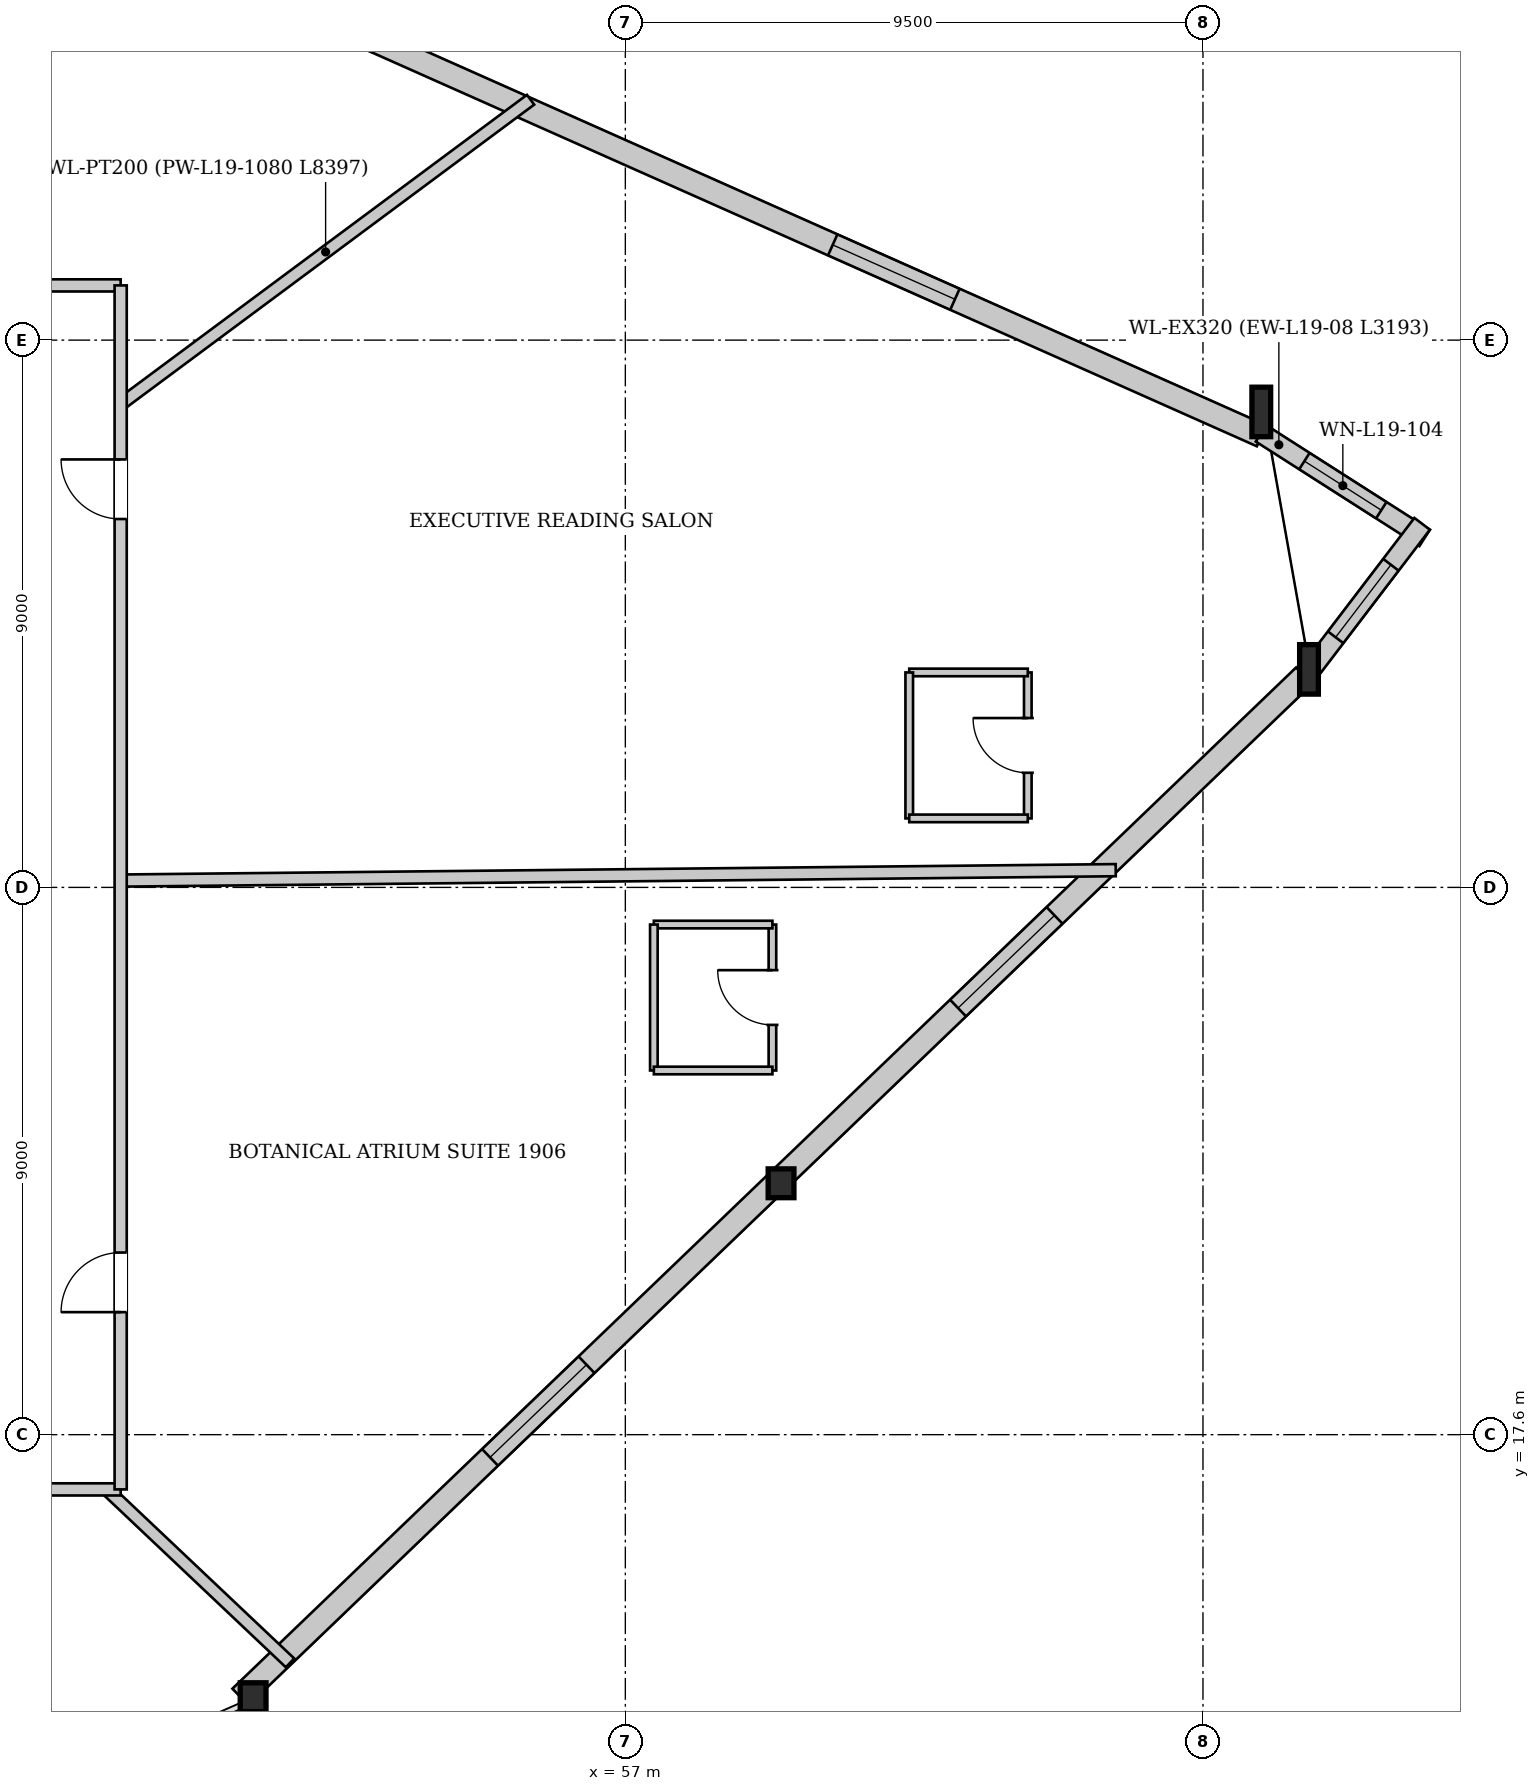
"""IFC4 building model, lengths in metres.
Left out: names, types, materials, properties, quantities, classifications, styles, units other than length and angle.
Written with IfcOpenShell. Run it as: python <this file> out.ifc"""

import sys

from ifc_helpers import new_model, si_unit, direction, frame, frame_2d, origin, origin_2d, place, context, subcontext, project, spatial, rectangle, i_section, extrude, source, transform, mapped, element, fill, save


model = new_model("IFC4")
c1 = context("Model", 3, precision=1e-05, world=origin(), true_north=direction((0.0, 1.0)))
c2 = subcontext(c1, "Body", "Model", "MODEL_VIEW")
j1 = project(units=[si_unit("LENGTHUNIT", "METRE"), si_unit("PLANEANGLEUNIT", "RADIAN")], contexts=[c1])
p1 = place(None, origin())
s1 = spatial("IfcSite", under=j1, at=p1, CompositionType="ELEMENT")
p2 = place(p1, origin())
s2 = spatial("IfcBuilding", under=s1, at=p2, CompositionType="ELEMENT")
p3 = place(p2, frame((0.0, 0.0, 75.9)))
s3 = spatial("IfcBuildingStorey", under=s2, at=p3, CompositionType="ELEMENT", Elevation=75.9)
m1 = source(origin(), c2, "Body", "SweptSolid", [
    extrude(i_section(OverallWidth=0.308, OverallDepth=0.814, WebThickness=0.021, FlangeThickness=0.04, at=origin_2d()), origin(), (0.0, 0.0, 1.0), 3.867),
])
p4 = place(p3, frame((68.295, 29.943, 0.0), z_axis=(-0.026704643692, 0.1255055122, 0.991733446251), x_axis=(-0.978103798124, -0.208117659259, 0.0)))
e1 = element("IfcColumn", 1, at=p4, inside=s3, PredefinedType="COLUMN", context=c2, shape_type="MappedRepresentation", body=[
    mapped(m1, transform((0.0, 0.0, 0.0), x_axis=(1.0, 0.0, 0.0), y_axis=(0.0, 1.0, 0.0), z_axis=(0.0, 0.0, 1.0), scale=1.0)),
])
m2 = source(origin(), c2, "Body", "SweptSolid", [
    extrude(i_section(OverallWidth=0.308, OverallDepth=0.814, WebThickness=0.021, FlangeThickness=0.04, at=origin_2d()), origin(), (0.0, 0.0, 1.0), 3.863),
])
p5 = place(p3, frame((67.541, 34.201, 0.0), z_axis=(-0.042151057581, 0.112739860157, 0.992730080272), x_axis=(-0.936673957719, -0.350202651233, 0.0)))
e2 = element("IfcColumn", 2, at=p5, inside=s3, PredefinedType="COLUMN", context=c2, shape_type="MappedRepresentation", body=[
    mapped(m2, transform((0.0, 0.0, 0.0), x_axis=(1.0, 0.0, 0.0), y_axis=(0.0, 1.0, 0.0), z_axis=(0.0, 0.0, 1.0), scale=1.0)),
])
m3 = source(origin(), c2, "Body", "SweptSolid", [
    extrude(i_section(OverallWidth=0.424, OverallDepth=0.474, WebThickness=0.043, FlangeThickness=0.068, at=origin_2d()), origin(), (0.0, 0.0, 1.0), 3.848),
])
p6 = place(p3, frame((50.801, 13.149, 0.0), z_axis=(0.040228034609, 0.069732823399, 0.996754251846), x_axis=(-0.866198707335, 0.499699709236, 0.0)))
e3 = element("IfcColumn", 3, at=p6, inside=s3, PredefinedType="COLUMN", context=c2, shape_type="MappedRepresentation", body=[
    mapped(m3, transform((0.0, 0.0, 0.0), x_axis=(1.0, 0.0, 0.0), y_axis=(0.0, 1.0, 0.0), z_axis=(0.0, 0.0, 1.0), scale=1.0)),
])
m4 = source(origin(), c2, "Body", "SweptSolid", [
    extrude(i_section(OverallWidth=0.424, OverallDepth=0.474, WebThickness=0.043, FlangeThickness=0.068, at=origin_2d()), origin(), (0.0, 0.0, 1.0), 3.854),
])
p7 = place(p3, frame((59.548, 21.546, 0.0), z_axis=(0.006715214046, 0.097814061193, 0.995182051352), x_axis=(-0.997651690921, 0.068491631631, 0.0)))
e4 = element("IfcColumn", 4, at=p7, inside=s3, PredefinedType="COLUMN", context=c2, shape_type="MappedRepresentation", body=[
    mapped(m4, transform((0.0, 0.0, 0.0), x_axis=(1.0, 0.0, 0.0), y_axis=(0.0, 1.0, 0.0), z_axis=(0.0, 0.0, 1.0), scale=1.0)),
])
p8 = place(p3, frame((45.866, 43.639, 0.0), z_axis=(0.0, 0.0, 1.0), x_axis=(0.91360999261, -0.406591664207, 0.0)))
e5 = element("IfcWall", 5, at=p8, inside=s3, PredefinedType="SOLIDWALL", context=c2, shape_type="SweptSolid", body=[
    extrude(rectangle(XDim=23.639, YDim=0.38, at=frame_2d((11.82, 0.0))), origin(), (0.0, 0.0, 1.0), 2.872),
])
p9 = place(p8, frame((5.519, 0.0, 0.502)))
e6 = element("IfcOpeningElement", 6, at=p9, cuts=e5, PredefinedType="OPENING", context=c2, shape_type="SweptSolid", body=[
    extrude(rectangle(XDim=2.2, YDim=2.25, at=frame_2d((1.1, 1.125))), frame((0.0, 0.2, 0.0), z_axis=(0.0, -1.0, 0.0), x_axis=(1.0, 0.0, 0.0)), (0.0, 0.0, 1.0), 0.4),
])
p10 = place(p8, frame((15.92, 0.0, 0.502)))
e7 = element("IfcOpeningElement", 7, at=p10, cuts=e5, PredefinedType="OPENING", context=c2, shape_type="SweptSolid", body=[
    extrude(rectangle(XDim=2.2, YDim=2.25, at=frame_2d((1.1, 1.125))), frame((0.0, 0.2, 0.0), z_axis=(0.0, -1.0, 0.0), x_axis=(1.0, 0.0, 0.0)), (0.0, 0.0, 1.0), 0.4),
])
p11 = place(p3, frame((67.454, 34.067, 0.0), z_axis=(0.0, 0.0, 1.0), x_axis=(0.842734794545, -0.53832895711, 0.0)))
e8 = element("IfcWall", 8, at=p11, inside=s3, PredefinedType="SOLIDWALL", context=c2, shape_type="SweptSolid", body=[
    extrude(rectangle(XDim=3.194, YDim=0.32, at=frame_2d((1.597, 0.0))), origin(), (0.0, 0.0, 1.0), 2.872),
])
p12 = place(p11, frame((0.847, 0.0, 0.452)))
e9 = element("IfcOpeningElement", 9, at=p12, cuts=e8, PredefinedType="OPENING", context=c2, shape_type="SweptSolid", body=[
    extrude(rectangle(XDim=1.5, YDim=2.3, at=frame_2d((0.75, 1.15))), frame((0.0, 0.17, 0.0), z_axis=(0.0, -1.0, 0.0), x_axis=(1.0, 0.0, 0.0)), (0.0, 0.0, 1.0), 0.34),
])
p13 = place(p3, frame((70.104, 32.579, 0.0), z_axis=(0.0, 0.0, 1.0), x_axis=(-0.606317277032, -0.795222836425, 0.0)))
e10 = element("IfcWall", 10, at=p13, inside=s3, PredefinedType="SOLIDWALL", context=c2, shape_type="SweptSolid", body=[
    extrude(rectangle(XDim=3.194, YDim=0.32, at=frame_2d((1.597, 0.0))), origin(), (0.0, 0.0, 1.0), 2.872),
])
p14 = place(p13, frame((0.847, 0.0, 0.452)))
e11 = element("IfcOpeningElement", 11, at=p14, cuts=e10, PredefinedType="OPENING", context=c2, shape_type="SweptSolid", body=[
    extrude(rectangle(XDim=1.5, YDim=2.3, at=frame_2d((0.75, 1.15))), frame((0.0, 0.17, 0.0), z_axis=(0.0, -1.0, 0.0), x_axis=(1.0, 0.0, 0.0)), (0.0, 0.0, 1.0), 0.34),
])
p15 = place(p3, frame((68.164, 30.08, 0.0), z_axis=(0.0, 0.0, 1.0), x_axis=(-0.721395971685, -0.692522816979, 0.0)))
e12 = element("IfcWall", 12, at=p15, inside=s3, PredefinedType="SOLIDWALL", context=c2, shape_type="SweptSolid", body=[
    extrude(rectangle(XDim=24.251, YDim=0.38, at=frame_2d((12.125, 0.0))), origin(), (0.0, 0.0, 1.0), 2.872),
])
p16 = place(p15, frame((5.69, 0.0, 0.502)))
e13 = element("IfcOpeningElement", 13, at=p16, cuts=e12, PredefinedType="OPENING", context=c2, shape_type="SweptSolid", body=[
    extrude(rectangle(XDim=2.2, YDim=2.25, at=frame_2d((1.1, 1.125))), frame((0.0, 0.2, 0.0), z_axis=(0.0, -1.0, 0.0), x_axis=(1.0, 0.0, 0.0)), (0.0, 0.0, 1.0), 0.4),
])
p17 = place(p15, frame((16.36, 0.0, 0.502)))
e14 = element("IfcOpeningElement", 14, at=p17, cuts=e12, PredefinedType="OPENING", context=c2, shape_type="SweptSolid", body=[
    extrude(rectangle(XDim=2.2, YDim=2.25, at=frame_2d((1.1, 1.125))), frame((0.0, 0.2, 0.0), z_axis=(0.0, -1.0, 0.0), x_axis=(1.0, 0.0, 0.0)), (0.0, 0.0, 1.0), 0.4),
])
p18 = place(p3, frame((48.7, 34.546, 0.0), z_axis=(0.0, 0.0, 1.0), x_axis=(0.8028205869, 0.596220685023, 0.0)))
e15 = element("IfcWall", 15, at=p18, inside=s3, PredefinedType="PARTITIONING", context=c2, shape_type="SweptSolid", body=[
    extrude(rectangle(XDim=8.397, YDim=0.2, at=frame_2d((4.199, 0.0))), origin(), (0.0, 0.0, 1.0), 3.58),
])
p19 = place(p3, frame((48.469, 16.7, 0.0), z_axis=(0.0, 0.0, 1.0), x_axis=(0.726589007233, -0.687072350316, 0.0)))
e16 = element("IfcWall", 16, at=p19, inside=s3, PredefinedType="PARTITIONING", context=c2, shape_type="SweptSolid", body=[
    extrude(rectangle(XDim=4.152, YDim=0.2, at=frame_2d((2.076, 0.0))), origin(), (0.0, 0.0, 1.0), 3.58),
])
p20 = place(p3, frame((48.7, 26.712, 0.0), z_axis=(0.0, 0.0, 1.0), x_axis=(0.999945322825, 0.010457120052, 0.0)))
e17 = element("IfcWall", 17, at=p20, inside=s3, PredefinedType="PARTITIONING", context=c2, shape_type="SweptSolid", body=[
    extrude(rectangle(XDim=16.366, YDim=0.2, at=frame_2d((8.183, 0.0))), origin(), (0.0, 0.0, 1.0), 3.58),
])
p21 = place(p3, frame((59.419, 23.589, 0.0), z_axis=(0.0, 0.0, 1.0), x_axis=(0.0, 1.0, 0.0)))
e18 = element("IfcWall", 18, at=p21, inside=s3, PredefinedType="PARTITIONING", context=c2, shape_type="SweptSolid", body=[
    extrude(rectangle(XDim=2.4, YDim=0.125, at=frame_2d((1.2, 0.0))), origin(), (0.0, 0.0, 1.0), 3.58),
])
p22 = place(p21, frame((0.75, 0.0, 0.0)))
e19 = element("IfcOpeningElement", 19, at=p22, cuts=e18, PredefinedType="OPENING", context=c2, shape_type="SweptSolid", body=[
    extrude(rectangle(XDim=0.9, YDim=2.1, at=frame_2d((0.45, 1.05))), frame((0.0, 0.073, 0.0), z_axis=(0.0, -1.0, 0.0), x_axis=(1.0, 0.0, 0.0)), (0.0, 0.0, 1.0), 0.145),
])
p23 = place(p3, frame((59.419, 25.989, 0.0), z_axis=(0.0, 0.0, 1.0), x_axis=(-1.0, 0.0, 0.0)))
e20 = element("IfcWall", 20, at=p23, inside=s3, PredefinedType="PARTITIONING", context=c2, shape_type="SweptSolid", body=[
    extrude(rectangle(XDim=1.95, YDim=0.125, at=frame_2d((0.975, 0.0))), origin(), (0.0, 0.0, 1.0), 3.58),
])
p24 = place(p3, frame((57.469, 25.989, 0.0), z_axis=(0.0, 0.0, 1.0), x_axis=(0.0, -1.0, 0.0)))
e21 = element("IfcWall", 21, at=p24, inside=s3, PredefinedType="PARTITIONING", context=c2, shape_type="SweptSolid", body=[
    extrude(rectangle(XDim=2.4, YDim=0.125, at=frame_2d((1.2, 0.0))), origin(), (0.0, 0.0, 1.0), 3.58),
])
p25 = place(p3, frame((57.469, 23.589, 0.0), z_axis=(0.0, 0.0, 1.0), x_axis=(1.0, 0.0, 0.0)))
e22 = element("IfcWall", 22, at=p25, inside=s3, PredefinedType="PARTITIONING", context=c2, shape_type="SweptSolid", body=[
    extrude(rectangle(XDim=1.95, YDim=0.125, at=frame_2d((0.975, 0.0))), origin(), (0.0, 0.0, 1.0), 3.58),
])
p26 = place(p3, frame((63.619, 27.735, 0.0), z_axis=(0.0, 0.0, 1.0), x_axis=(0.0, 1.0, 0.0)))
e23 = element("IfcWall", 23, at=p26, inside=s3, PredefinedType="PARTITIONING", context=c2, shape_type="SweptSolid", body=[
    extrude(rectangle(XDim=2.4, YDim=0.125, at=frame_2d((1.2, 0.0))), origin(), (0.0, 0.0, 1.0), 3.58),
])
p27 = place(p26, frame((0.75, 0.0, 0.0)))
e24 = element("IfcOpeningElement", 24, at=p27, cuts=e23, PredefinedType="OPENING", context=c2, shape_type="SweptSolid", body=[
    extrude(rectangle(XDim=0.9, YDim=2.1, at=frame_2d((0.45, 1.05))), frame((0.0, 0.073, 0.0), z_axis=(0.0, -1.0, 0.0), x_axis=(1.0, 0.0, 0.0)), (0.0, 0.0, 1.0), 0.145),
])
p28 = place(p3, frame((63.619, 30.135, 0.0), z_axis=(0.0, 0.0, 1.0), x_axis=(-1.0, 0.0, 0.0)))
e25 = element("IfcWall", 25, at=p28, inside=s3, PredefinedType="PARTITIONING", context=c2, shape_type="SweptSolid", body=[
    extrude(rectangle(XDim=1.95, YDim=0.125, at=frame_2d((0.975, 0.0))), origin(), (0.0, 0.0, 1.0), 3.58),
])
p29 = place(p3, frame((61.669, 30.135, 0.0), z_axis=(0.0, 0.0, 1.0), x_axis=(0.0, -1.0, 0.0)))
e26 = element("IfcWall", 26, at=p29, inside=s3, PredefinedType="PARTITIONING", context=c2, shape_type="SweptSolid", body=[
    extrude(rectangle(XDim=2.4, YDim=0.125, at=frame_2d((1.2, 0.0))), origin(), (0.0, 0.0, 1.0), 3.58),
])
p30 = place(p3, frame((61.669, 27.735, 0.0), z_axis=(0.0, 0.0, 1.0), x_axis=(1.0, 0.0, 0.0)))
e27 = element("IfcWall", 27, at=p30, inside=s3, PredefinedType="PARTITIONING", context=c2, shape_type="SweptSolid", body=[
    extrude(rectangle(XDim=1.95, YDim=0.125, at=frame_2d((0.975, 0.0))), origin(), (0.0, 0.0, 1.0), 3.58),
])
p31 = place(p3, frame((39.85, 16.7, 0.0), z_axis=(0.0, 0.0, 1.0), x_axis=(1.0, 0.0, 0.0)))
e28 = element("IfcWall", 28, at=p31, inside=s3, PredefinedType="PARTITIONING", context=c2, shape_type="SweptSolid", body=[
    extrude(rectangle(XDim=8.85, YDim=0.2, at=frame_2d((4.425, 0.0))), origin(), (0.0, 0.0, 1.0), 3.58),
])
p32 = place(p31, frame((3.294, 0.0, 0.0)))
e29 = element("IfcOpeningElement", 29, at=p32, cuts=e28, PredefinedType="OPENING", context=c2, shape_type="SweptSolid", body=[
    extrude(rectangle(XDim=0.98, YDim=2.15, at=frame_2d((0.49, 1.075))), frame((0.0, 0.11, 0.0), z_axis=(0.0, -1.0, 0.0), x_axis=(1.0, 0.0, 0.0)), (0.0, 0.0, 1.0), 0.22),
])
p33 = place(p3, frame((27.3, 36.5, 0.0), z_axis=(0.0, 0.0, 1.0), x_axis=(1.0, 0.0, 0.0)))
e30 = element("IfcWall", 30, at=p33, inside=s3, PredefinedType="PARTITIONING", context=c2, shape_type="SweptSolid", body=[
    extrude(rectangle(XDim=21.4, YDim=0.2, at=frame_2d((10.7, 0.0))), origin(), (0.0, 0.0, 1.0), 3.58),
])
p34 = place(p33, frame((15.035, 0.0, 0.0)))
e31 = element("IfcOpeningElement", 31, at=p34, cuts=e30, PredefinedType="OPENING", context=c2, shape_type="SweptSolid", body=[
    extrude(rectangle(XDim=1.6, YDim=2.2, at=frame_2d((0.8, 1.1))), frame((0.0, 0.11, 0.0), z_axis=(0.0, -1.0, 0.0), x_axis=(1.0, 0.0, 0.0)), (0.0, 0.0, 1.0), 0.22),
])
p35 = place(p3, frame((48.7, 16.7, 0.0), z_axis=(0.0, 0.0, 1.0), x_axis=(0.0, 1.0, 0.0)))
e32 = element("IfcWall", 32, at=p35, inside=s3, PredefinedType="PARTITIONING", context=c2, shape_type="SweptSolid", body=[
    extrude(rectangle(XDim=19.8, YDim=0.2, at=frame_2d((9.9, 0.0))), origin(), (0.0, 0.0, 1.0), 3.58),
])
p36 = place(p35, frame((2.915, 0.0, 0.0)))
e33 = element("IfcOpeningElement", 33, at=p36, cuts=e32, PredefinedType="OPENING", context=c2, shape_type="SweptSolid", body=[
    extrude(rectangle(XDim=0.98, YDim=2.15, at=frame_2d((0.49, 1.075))), frame((0.0, 0.11, 0.0), z_axis=(0.0, -1.0, 0.0), x_axis=(1.0, 0.0, 0.0)), (0.0, 0.0, 1.0), 0.22),
])
p37 = place(p35, frame((15.958, 0.0, 0.0)))
e34 = element("IfcOpeningElement", 34, at=p37, cuts=e32, PredefinedType="OPENING", context=c2, shape_type="SweptSolid", body=[
    extrude(rectangle(XDim=0.98, YDim=2.15, at=frame_2d((0.49, 1.075))), frame((0.0, 0.11, 0.0), z_axis=(0.0, -1.0, 0.0), x_axis=(1.0, 0.0, 0.0)), (0.0, 0.0, 1.0), 0.22),
])
m5 = source(origin(), c2, "Body", "SweptSolid", [
    extrude(rectangle(XDim=2.2, YDim=2.25, at=frame_2d((1.1, 1.125))), frame((0.0, 0.03, 0.0), z_axis=(0.0, -1.0, 0.0), x_axis=(1.0, 0.0, 0.0)), (0.0, 0.0, 1.0), 0.06),
])
p38 = place(p10, origin())
e35 = element("IfcWindow", 35, at=p38, inside=s3, PartitioningType="SINGLE_PANEL", PredefinedType="WINDOW", context=c2, shape_type="MappedRepresentation", body=[
    mapped(m5, transform((0.0, 0.0, 0.0), x_axis=(1.0, 0.0, 0.0), y_axis=(0.0, 1.0, 0.0), z_axis=(0.0, 0.0, 1.0), scale=1.0)),
])
fill(e7, e35)
m6 = source(origin(), c2, "Body", "SweptSolid", [
    extrude(rectangle(XDim=1.5, YDim=2.3, at=frame_2d((0.75, 1.15))), frame((0.0, 0.03, 0.0), z_axis=(0.0, -1.0, 0.0), x_axis=(1.0, 0.0, 0.0)), (0.0, 0.0, 1.0), 0.06),
])
p39 = place(p12, origin())
e36 = element("IfcWindow", 36, at=p39, inside=s3, PartitioningType="SINGLE_PANEL", PredefinedType="WINDOW", context=c2, shape_type="MappedRepresentation", body=[
    mapped(m6, transform((0.0, 0.0, 0.0), x_axis=(1.0, 0.0, 0.0), y_axis=(0.0, 1.0, 0.0), z_axis=(0.0, 0.0, 1.0), scale=1.0)),
])
fill(e9, e36)
p40 = place(p14, origin())
e37 = element("IfcWindow", 37, at=p40, inside=s3, PartitioningType="SINGLE_PANEL", PredefinedType="WINDOW", context=c2, shape_type="MappedRepresentation", body=[
    mapped(m6, transform((0.0, 0.0, 0.0), x_axis=(1.0, 0.0, 0.0), y_axis=(0.0, 1.0, 0.0), z_axis=(0.0, 0.0, 1.0), scale=1.0)),
])
fill(e11, e37)
p41 = place(p16, origin())
e38 = element("IfcWindow", 38, at=p41, inside=s3, PartitioningType="SINGLE_PANEL", PredefinedType="WINDOW", context=c2, shape_type="MappedRepresentation", body=[
    mapped(m5, transform((0.0, 0.0, 0.0), x_axis=(1.0, 0.0, 0.0), y_axis=(0.0, 1.0, 0.0), z_axis=(0.0, 0.0, 1.0), scale=1.0)),
])
fill(e13, e38)
p42 = place(p17, origin())
e39 = element("IfcWindow", 39, at=p42, inside=s3, PartitioningType="SINGLE_PANEL", PredefinedType="WINDOW", context=c2, shape_type="MappedRepresentation", body=[
    mapped(m5, transform((0.0, 0.0, 0.0), x_axis=(1.0, 0.0, 0.0), y_axis=(0.0, 1.0, 0.0), z_axis=(0.0, 0.0, 1.0), scale=1.0)),
])
fill(e14, e39)
m7 = source(origin(), c2, "Body", "SweptSolid", [
    extrude(rectangle(XDim=0.9, YDim=2.1, at=frame_2d((0.45, 1.05))), frame((0.0, 0.025, 0.0), z_axis=(0.0, -1.0, 0.0), x_axis=(1.0, 0.0, 0.0)), (0.0, 0.0, 1.0), 0.05),
])
p43 = place(p22, origin())
e40 = element("IfcDoor", 40, at=p43, inside=s3, OperationType="SINGLE_SWING_RIGHT", PredefinedType="DOOR", context=c2, shape_type="MappedRepresentation", body=[
    mapped(m7, transform((0.0, 0.0, 0.0), x_axis=(1.0, 0.0, 0.0), y_axis=(0.0, 1.0, 0.0), z_axis=(0.0, 0.0, 1.0), scale=1.0)),
])
fill(e19, e40)
p44 = place(p27, origin())
e41 = element("IfcDoor", 41, at=p44, inside=s3, OperationType="SINGLE_SWING_RIGHT", PredefinedType="DOOR", context=c2, shape_type="MappedRepresentation", body=[
    mapped(m7, transform((0.0, 0.0, 0.0), x_axis=(1.0, 0.0, 0.0), y_axis=(0.0, 1.0, 0.0), z_axis=(0.0, 0.0, 1.0), scale=1.0)),
])
fill(e24, e41)
m8 = source(origin(), c2, "Body", "SweptSolid", [
    extrude(rectangle(XDim=0.98, YDim=2.15, at=frame_2d((0.49, 1.075))), frame((0.0, 0.025, 0.0), z_axis=(0.0, -1.0, 0.0), x_axis=(1.0, 0.0, 0.0)), (0.0, 0.0, 1.0), 0.05),
])
p45 = place(p36, origin())
e42 = element("IfcDoor", 42, at=p45, inside=s3, OperationType="SINGLE_SWING_LEFT", PredefinedType="DOOR", context=c2, shape_type="MappedRepresentation", body=[
    mapped(m8, transform((0.0, 0.0, 0.0), x_axis=(1.0, 0.0, 0.0), y_axis=(0.0, 1.0, 0.0), z_axis=(0.0, 0.0, 1.0), scale=1.0)),
])
fill(e33, e42)
p46 = place(p37, origin())
e43 = element("IfcDoor", 43, at=p46, inside=s3, OperationType="SINGLE_SWING_RIGHT", PredefinedType="DOOR", context=c2, shape_type="MappedRepresentation", body=[
    mapped(m8, transform((0.0, 0.0, 0.0), x_axis=(1.0, 0.0, 0.0), y_axis=(0.0, 1.0, 0.0), z_axis=(0.0, 0.0, 1.0), scale=1.0)),
])
fill(e34, e43)
save(model, sys.argv[1])
